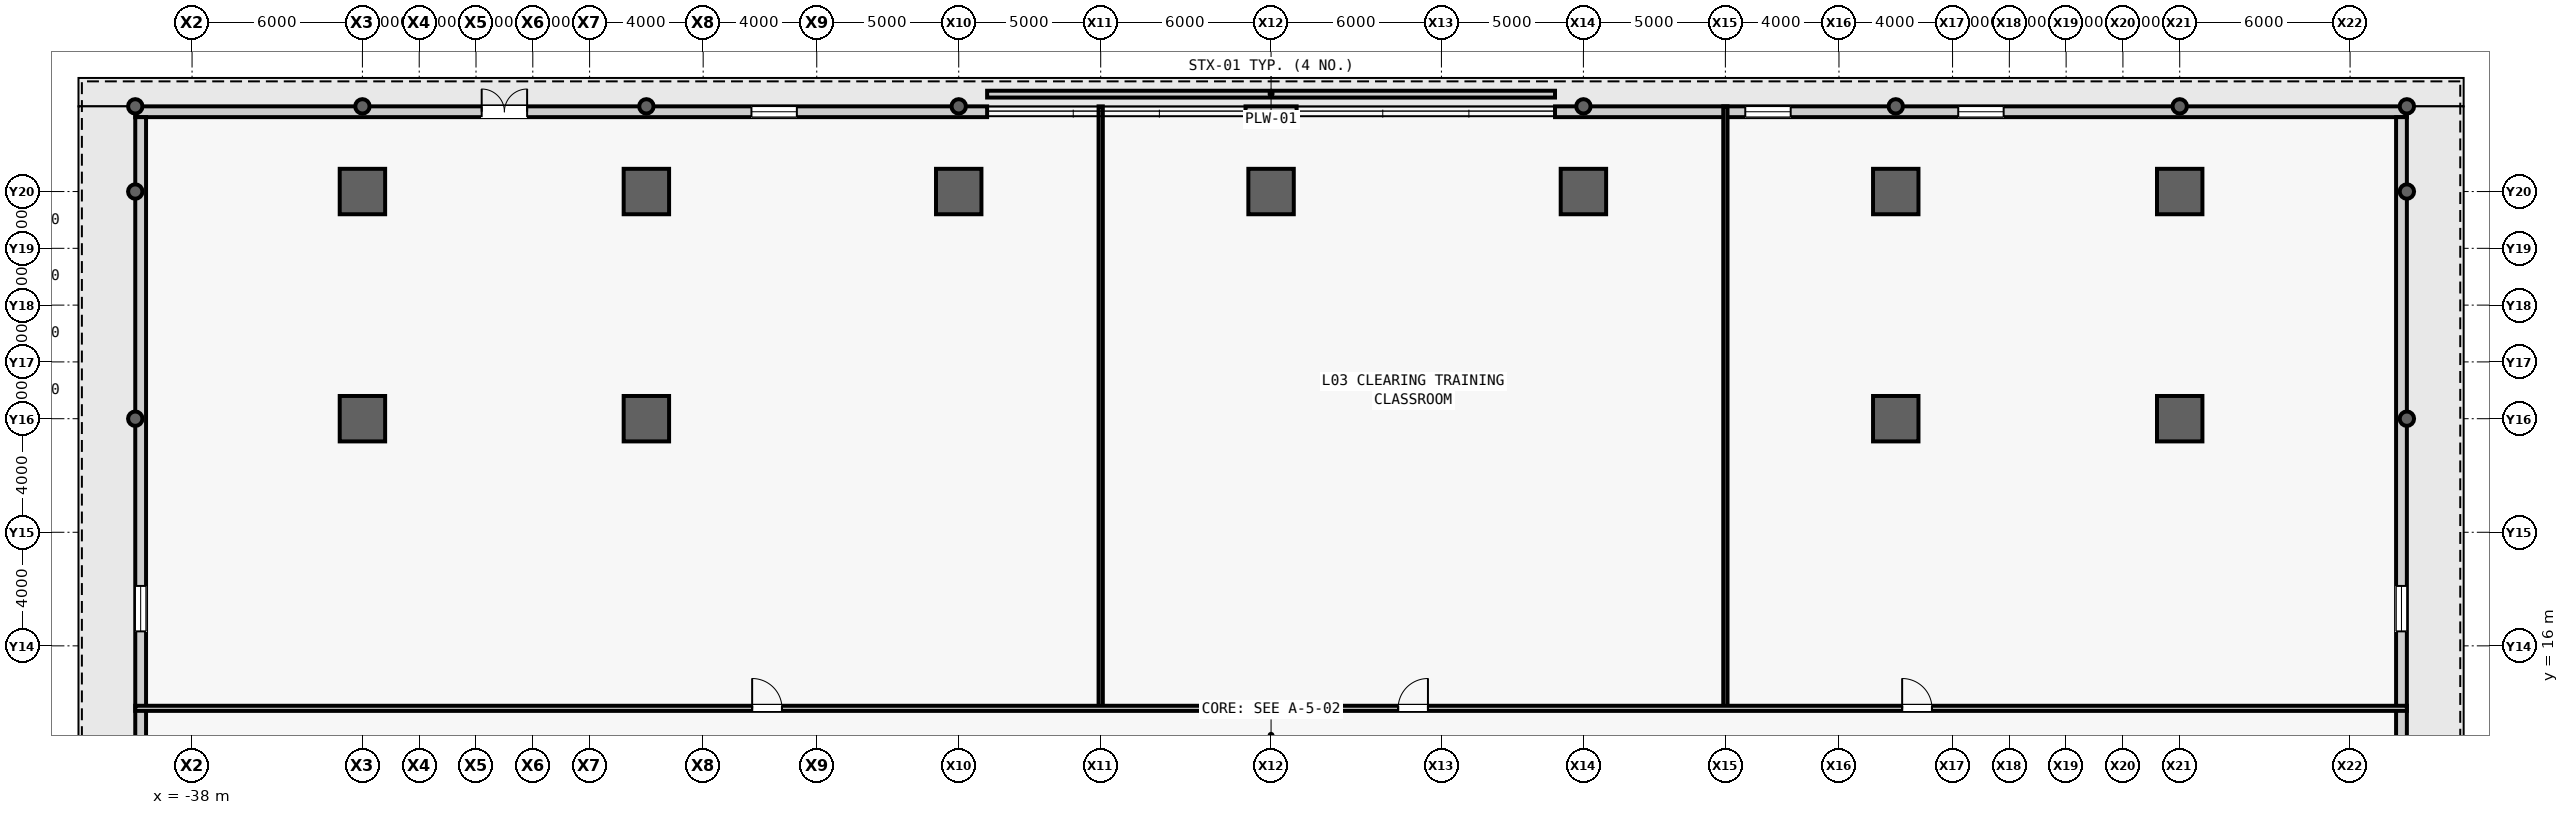
"""IFC4 building model, lengths in metres.
Left out: names, types, materials, properties, quantities, classifications, styles, units other than length and angle.
Written with IfcOpenShell. Run it as: python <this file> out.ifc"""

import sys

from ifc_helpers import new_model, si_unit, direction, frame, frame_2d, origin, origin_2d, place, context, subcontext, project, spatial, rectangle, hollow_circle, extrude, source, transform, mapped, element, fill, save


model = new_model("IFC4")
c1 = context("Model", 3, precision=1e-05, world=origin(), true_north=direction((0.0, 1.0)))
c2 = subcontext(c1, "Body", "Model", "MODEL_VIEW")
j1 = project(units=[si_unit("LENGTHUNIT", "METRE"), si_unit("PLANEANGLEUNIT", "RADIAN")], contexts=[c1])
p1 = place(None, origin())
s1 = spatial("IfcSite", under=j1, at=p1, CompositionType="ELEMENT")
p2 = place(p1, origin())
s2 = spatial("IfcBuilding", under=s1, at=p2, CompositionType="ELEMENT")
p3 = place(p2, frame((0.0, 0.0, 17.4)))
s3 = spatial("IfcBuildingStorey", under=s2, at=p3, CompositionType="ELEMENT", Elevation=17.4)
m1 = source(origin(), c2, "Body", "SweptSolid", [
    extrude(hollow_circle(Radius=0.254, WallThickness=0.025, at=origin_2d()), origin(), (0.0, 0.0, 1.0), 4.8),
])
for number, where, z_axis, x_axis in (
    (1, (-40.0, 24.0, 0.0), (0.0, 0.0, 1.0), (1.0, 0.0, 0.0)),
    (2, (-40.0, 35.0, 0.0), (0.0, 0.0, 1.0), (1.0, 0.0, 0.0)),
):
    element("IfcColumn", number, at=place(p3, frame(where, z_axis=z_axis, x_axis=x_axis)), inside=s3, PredefinedType="COLUMN", context=c2, shape_type="MappedRepresentation", body=[
        mapped(m1, transform((0.0, 0.0, 0.0), scale=1.0)),
    ])
m2 = source(origin(), c2, "Body", "SweptSolid", [
    extrude(rectangle(XDim=1.6, YDim=1.6, at=origin_2d()), origin(), (0.0, 0.0, 1.0), 4.8),
])
for number, where, z_axis, x_axis in (
    (3, (-32.0, 24.0, 0.0), (0.0, 0.0, 1.0), (1.0, 0.0, 0.0)),
    (4, (-32.0, 32.0, 0.0), (0.0, 0.0, 1.0), (1.0, 0.0, 0.0)),
):
    element("IfcColumn", number, at=place(p3, frame(where, z_axis=z_axis, x_axis=x_axis)), inside=s3, PredefinedType="COLUMN", context=c2, shape_type="MappedRepresentation", body=[
        mapped(m2, transform((0.0, 0.0, 0.0), scale=1.0)),
    ])
p4 = place(p3, frame((-32.0, 35.0, 0.0), z_axis=(0.0, 0.0, 1.0), x_axis=(1.0, 0.0, 0.0)))
e5 = element("IfcColumn", 5, at=p4, inside=s3, PredefinedType="COLUMN", context=c2, shape_type="MappedRepresentation", body=[
    mapped(m1, transform((0.0, 0.0, 0.0), scale=1.0)),
])
for number, where, z_axis, x_axis in (
    (6, (-22.0, 24.0, 0.0), (0.0, 0.0, 1.0), (1.0, 0.0, 0.0)),
    (7, (-22.0, 32.0, 0.0), (0.0, 0.0, 1.0), (1.0, 0.0, 0.0)),
):
    element("IfcColumn", number, at=place(p3, frame(where, z_axis=z_axis, x_axis=x_axis)), inside=s3, PredefinedType="COLUMN", context=c2, shape_type="MappedRepresentation", body=[
        mapped(m2, transform((0.0, 0.0, 0.0), scale=1.0)),
    ])
p5 = place(p3, frame((-22.0, 35.0, 0.0), z_axis=(0.0, 0.0, 1.0), x_axis=(1.0, 0.0, 0.0)))
e8 = element("IfcColumn", 8, at=p5, inside=s3, PredefinedType="COLUMN", context=c2, shape_type="MappedRepresentation", body=[
    mapped(m1, transform((0.0, 0.0, 0.0), scale=1.0)),
])
p6 = place(p3, frame((-11.0, 32.0, 0.0), z_axis=(0.0, 0.0, 1.0), x_axis=(1.0, 0.0, 0.0)))
e9 = element("IfcColumn", 9, at=p6, inside=s3, PredefinedType="COLUMN", context=c2, shape_type="MappedRepresentation", body=[
    mapped(m2, transform((0.0, 0.0, 0.0), scale=1.0)),
])
p7 = place(p3, frame((-11.0, 35.0, 0.0), z_axis=(0.0, 0.0, 1.0), x_axis=(1.0, 0.0, 0.0)))
e10 = element("IfcColumn", 10, at=p7, inside=s3, PredefinedType="COLUMN", context=c2, shape_type="MappedRepresentation", body=[
    mapped(m1, transform((0.0, 0.0, 0.0), scale=1.0)),
])
for number, where, z_axis, x_axis in (
    (11, (0.0, 32.0, 0.0), (0.0, 0.0, 1.0), (1.0, 0.0, 0.0)),
    (12, (11.0, 32.0, 0.0), (0.0, 0.0, 1.0), (1.0, 0.0, 0.0)),
):
    element("IfcColumn", number, at=place(p3, frame(where, z_axis=z_axis, x_axis=x_axis)), inside=s3, PredefinedType="COLUMN", context=c2, shape_type="MappedRepresentation", body=[
        mapped(m2, transform((0.0, 0.0, 0.0), scale=1.0)),
    ])
p8 = place(p3, frame((11.0, 35.0, 0.0), z_axis=(0.0, 0.0, 1.0), x_axis=(1.0, 0.0, 0.0)))
e13 = element("IfcColumn", 13, at=p8, inside=s3, PredefinedType="COLUMN", context=c2, shape_type="MappedRepresentation", body=[
    mapped(m1, transform((0.0, 0.0, 0.0), scale=1.0)),
])
for number, where, z_axis, x_axis in (
    (14, (22.0, 24.0, 0.0), (0.0, 0.0, 1.0), (1.0, 0.0, 0.0)),
    (15, (22.0, 32.0, 0.0), (0.0, 0.0, 1.0), (1.0, 0.0, 0.0)),
):
    element("IfcColumn", number, at=place(p3, frame(where, z_axis=z_axis, x_axis=x_axis)), inside=s3, PredefinedType="COLUMN", context=c2, shape_type="MappedRepresentation", body=[
        mapped(m2, transform((0.0, 0.0, 0.0), scale=1.0)),
    ])
p9 = place(p3, frame((22.0, 35.0, 0.0), z_axis=(0.0, 0.0, 1.0), x_axis=(1.0, 0.0, 0.0)))
e16 = element("IfcColumn", 16, at=p9, inside=s3, PredefinedType="COLUMN", context=c2, shape_type="MappedRepresentation", body=[
    mapped(m1, transform((0.0, 0.0, 0.0), scale=1.0)),
])
for number, where, z_axis, x_axis in (
    (17, (32.0, 24.0, 0.0), (0.0, 0.0, 1.0), (1.0, 0.0, 0.0)),
    (18, (32.0, 32.0, 0.0), (0.0, 0.0, 1.0), (1.0, 0.0, 0.0)),
):
    element("IfcColumn", number, at=place(p3, frame(where, z_axis=z_axis, x_axis=x_axis)), inside=s3, PredefinedType="COLUMN", context=c2, shape_type="MappedRepresentation", body=[
        mapped(m2, transform((0.0, 0.0, 0.0), scale=1.0)),
    ])
for number, where, z_axis, x_axis in (
    (19, (32.0, 35.0, 0.0), (0.0, 0.0, 1.0), (1.0, 0.0, 0.0)),
    (20, (40.0, 24.0, 0.0), (0.0, 0.0, 1.0), (1.0, 0.0, 0.0)),
    (21, (40.0, 35.0, 0.0), (0.0, 0.0, 1.0), (1.0, 0.0, 0.0)),
    (22, (-40.0, 32.0, 0.0), (0.0, 0.0, 1.0), (1.0, 0.0, 0.0)),
    (23, (40.0, 32.0, 0.0), (0.0, 0.0, 1.0), (1.0, 0.0, 0.0)),
):
    element("IfcColumn", number, at=place(p3, frame(where, z_axis=z_axis, x_axis=x_axis)), inside=s3, PredefinedType="COLUMN", context=c2, shape_type="MappedRepresentation", body=[
        mapped(m1, transform((0.0, 0.0, 0.0), scale=1.0)),
    ])
m3 = source(origin(), c2, "Body", "SweptSolid", [
    extrude(rectangle(XDim=30.0, YDim=0.38, at=frame_2d((15.0, 0.0))), origin(), (0.0, 0.0, 1.0), 2.68),
])
p10 = place(p3, frame((-40.0, 34.81, 0.0), z_axis=(0.0, 0.0, 1.0), x_axis=(1.0, 0.0, 0.0)))
e24 = element("IfcWall", 24, at=p10, inside=s3, PredefinedType="STANDARD", context=c2, shape_type="MappedRepresentation", body=[
    mapped(m3, transform((0.0, 0.0, 0.0), scale=1.0)),
])
m4 = source(origin(), c2, "Body", "SweptSolid", [
    extrude(rectangle(XDim=1.6, YDim=2.25, at=frame_2d((0.8, 1.125))), frame((0.0, 0.2, 0.0), z_axis=(0.0, -1.0, 0.0), x_axis=(1.0, 0.0, 0.0)), (0.0, 0.0, 1.0), 0.4),
])
p11 = place(p10, frame((12.2, 0.0, 0.0)))
e25 = element("IfcOpeningElement", 25, at=p11, cuts=e24, PredefinedType="OPENING", context=c2, shape_type="MappedRepresentation", body=[
    mapped(m4, transform((0.0, 0.0, 0.0), scale=1.0)),
])
m5 = source(origin(), c2, "Body", "SweptSolid", [
    extrude(rectangle(XDim=1.6, YDim=1.96, at=frame_2d((0.8, 0.98))), frame((0.0, 0.2, 0.0), z_axis=(0.0, -1.0, 0.0), x_axis=(1.0, 0.0, 0.0)), (0.0, 0.0, 1.0), 0.4),
])
p12 = place(p10, frame((21.7, 0.0, 0.5)))
e26 = element("IfcOpeningElement", 26, at=p12, cuts=e24, PredefinedType="OPENING", context=c2, shape_type="MappedRepresentation", body=[
    mapped(m5, transform((0.0, 0.0, 0.0), scale=1.0)),
])
m6 = source(origin(), c2, "Body", "SweptSolid", [
    extrude(rectangle(XDim=1.8, YDim=0.38, at=frame_2d((0.9, 0.0))), origin(), (0.0, 0.0, 1.0), 2.68),
])
p13 = place(p3, frame((-0.9, 34.81, 0.0), z_axis=(0.0, 0.0, 1.0), x_axis=(1.0, 0.0, 0.0)))
e27 = element("IfcWall", 27, at=p13, inside=s3, PredefinedType="STANDARD", context=c2, shape_type="MappedRepresentation", body=[
    mapped(m6, transform((0.0, 0.0, 0.0), scale=1.0)),
])
p14 = place(p3, frame((10.0, 34.81, 0.0), z_axis=(0.0, 0.0, 1.0), x_axis=(1.0, 0.0, 0.0)))
e28 = element("IfcWall", 28, at=p14, inside=s3, PredefinedType="STANDARD", context=c2, shape_type="MappedRepresentation", body=[
    mapped(m3, transform((0.0, 0.0, 0.0), scale=1.0)),
])
p15 = place(p14, frame((6.7, 0.0, 0.5)))
e29 = element("IfcOpeningElement", 29, at=p15, cuts=e28, PredefinedType="OPENING", context=c2, shape_type="MappedRepresentation", body=[
    mapped(m5, transform((0.0, 0.0, 0.0), scale=1.0)),
])
p16 = place(p14, frame((14.2, 0.0, 0.5)))
e30 = element("IfcOpeningElement", 30, at=p16, cuts=e28, PredefinedType="OPENING", context=c2, shape_type="MappedRepresentation", body=[
    mapped(m5, transform((0.0, 0.0, 0.0), scale=1.0)),
])
m7 = source(origin(), c2, "Body", "SweptSolid", [
    extrude(rectangle(XDim=69.24, YDim=0.38, at=frame_2d((34.62, 0.0))), origin(), (0.0, 0.0, 1.0), 2.68),
])
p17 = place(p3, frame((-39.81, -34.62, 0.0), z_axis=(0.0, 0.0, 1.0), x_axis=(0.0, 1.0, 0.0)))
e31 = element("IfcWall", 31, at=p17, inside=s3, PredefinedType="STANDARD", context=c2, shape_type="MappedRepresentation", body=[
    mapped(m7, transform((0.0, 0.0, 0.0), scale=1.0)),
])
p18 = place(p17, frame((39.82, 0.0, 0.0)))
e32 = element("IfcOpeningElement", 32, at=p18, cuts=e31, PredefinedType="OPENING", context=c2, shape_type="MappedRepresentation", body=[
    mapped(m4, transform((0.0, 0.0, 0.0), scale=1.0)),
])
p19 = place(p17, frame((16.51, 0.0, 0.5)))
e33 = element("IfcOpeningElement", 33, at=p19, cuts=e31, PredefinedType="OPENING", context=c2, shape_type="MappedRepresentation", body=[
    mapped(m5, transform((0.0, 0.0, 0.0), scale=1.0)),
])
p20 = place(p17, frame((51.13, 0.0, 0.5)))
e34 = element("IfcOpeningElement", 34, at=p20, cuts=e31, PredefinedType="OPENING", context=c2, shape_type="MappedRepresentation", body=[
    mapped(m5, transform((0.0, 0.0, 0.0), scale=1.0)),
])
p21 = place(p3, frame((39.81, -34.62, 0.0), z_axis=(0.0, 0.0, 1.0), x_axis=(0.0, 1.0, 0.0)))
e35 = element("IfcWall", 35, at=p21, inside=s3, PredefinedType="STANDARD", context=c2, shape_type="MappedRepresentation", body=[
    mapped(m7, transform((0.0, 0.0, 0.0), scale=1.0)),
])
p22 = place(p21, frame((39.82, 0.0, 0.0)))
e36 = element("IfcOpeningElement", 36, at=p22, cuts=e35, PredefinedType="OPENING", context=c2, shape_type="MappedRepresentation", body=[
    mapped(m4, transform((0.0, 0.0, 0.0), scale=1.0)),
])
p23 = place(p21, frame((16.51, 0.0, 0.5)))
e37 = element("IfcOpeningElement", 37, at=p23, cuts=e35, PredefinedType="OPENING", context=c2, shape_type="MappedRepresentation", body=[
    mapped(m5, transform((0.0, 0.0, 0.0), scale=1.0)),
])
p24 = place(p21, frame((51.13, 0.0, 0.5)))
e38 = element("IfcOpeningElement", 38, at=p24, cuts=e35, PredefinedType="OPENING", context=c2, shape_type="MappedRepresentation", body=[
    mapped(m5, transform((0.0, 0.0, 0.0), scale=1.0)),
])
m8 = source(origin(), c2, "Body", "SweptSolid", [
    extrude(rectangle(XDim=20.0, YDim=0.24, at=frame_2d((10.0, 0.0))), origin(), (0.0, 0.0, 1.0), 0.65),
])
p25 = place(p3, frame((-10.0, 35.43, 0.0), z_axis=(0.0, 0.0, 1.0), x_axis=(1.0, 0.0, 0.0)))
e39 = element("IfcWall", 39, at=p25, inside=s3, PredefinedType="STANDARD", context=c2, shape_type="MappedRepresentation", body=[
    mapped(m8, transform((0.0, 0.0, 0.0), scale=1.0)),
])
m9 = source(origin(), c2, "Body", "SweptSolid", [
    extrude(rectangle(XDim=21.2, YDim=0.15, at=frame_2d((10.6, 0.0))), origin(), (0.0, 0.0, 1.0), 4.48),
])
for number, where, z_axis, x_axis in (
    (40, (-6.0, 13.8, 0.0), (0.0, 0.0, 1.0), (0.0, 1.0, 0.0)),
    (41, (16.0, 13.8, 0.0), (0.0, 0.0, 1.0), (0.0, 1.0, 0.0)),
):
    element("IfcWall", number, at=place(p3, frame(where, z_axis=z_axis, x_axis=x_axis)), inside=s3, PredefinedType="PARTITIONING", context=c2, shape_type="MappedRepresentation", body=[
        mapped(m9, transform((0.0, 0.0, 0.0), scale=1.0)),
    ])
m10 = source(origin(), c2, "Body", "SweptSolid", [
    extrude(rectangle(XDim=80.0, YDim=0.18, at=frame_2d((40.0, 0.0))), origin(), (0.0, 0.0, 1.0), 4.48),
])
p26 = place(p3, frame((-40.0, 13.8, 0.0), z_axis=(0.0, 0.0, 1.0), x_axis=(1.0, 0.0, 0.0)))
e42 = element("IfcWall", 42, at=p26, inside=s3, PredefinedType="PARTITIONING", context=c2, shape_type="MappedRepresentation", body=[
    mapped(m10, transform((0.0, 0.0, 0.0), scale=1.0)),
])
m11 = source(origin(), c2, "Body", "SweptSolid", [
    extrude(rectangle(XDim=1.05, YDim=2.2, at=frame_2d((0.525, 1.1))), frame((0.0, 0.1, 0.0), z_axis=(0.0, -1.0, 0.0), x_axis=(1.0, 0.0, 0.0)), (0.0, 0.0, 1.0), 0.2),
])
p27 = place(p26, frame((21.725, 0.0, 0.0)))
e43 = element("IfcOpeningElement", 43, at=p27, cuts=e42, PredefinedType="OPENING", context=c2, shape_type="MappedRepresentation", body=[
    mapped(m11, transform((0.0, 0.0, 0.0), scale=1.0)),
])
p28 = place(p26, frame((44.475, 0.0, 0.0)))
e44 = element("IfcOpeningElement", 44, at=p28, cuts=e42, PredefinedType="OPENING", context=c2, shape_type="MappedRepresentation", body=[
    mapped(m11, transform((0.0, 0.0, 0.0), scale=1.0)),
])
p29 = place(p26, frame((62.225, 0.0, 0.0)))
e45 = element("IfcOpeningElement", 45, at=p29, cuts=e42, PredefinedType="OPENING", context=c2, shape_type="MappedRepresentation", body=[
    mapped(m11, transform((0.0, 0.0, 0.0), scale=1.0)),
])
m12 = source(origin(), c2, "Body", "SweptSolid", [
    extrude(rectangle(XDim=1.6, YDim=2.25, at=frame_2d((0.8, 1.125))), frame((0.0, 0.025, 0.0), z_axis=(0.0, -1.0, 0.0), x_axis=(1.0, 0.0, 0.0)), (0.0, 0.0, 1.0), 0.05),
])
p30 = place(p11, origin())
e46 = element("IfcDoor", 46, at=p30, inside=s3, OperationType="DOUBLE_DOOR_SINGLE_SWING", PredefinedType="DOOR", context=c2, shape_type="MappedRepresentation", body=[
    mapped(m12, transform((0.0, 0.0, 0.0), scale=1.0)),
])
fill(e25, e46)
m13 = source(origin(), c2, "Body", "SweptSolid", [
    extrude(rectangle(XDim=1.6, YDim=1.96, at=frame_2d((0.8, 0.98))), frame((0.0, 0.03, 0.0), z_axis=(0.0, -1.0, 0.0), x_axis=(1.0, 0.0, 0.0)), (0.0, 0.0, 1.0), 0.06),
])
p31 = place(p12, origin())
e47 = element("IfcWindow", 47, at=p31, inside=s3, PartitioningType="SINGLE_PANEL", PredefinedType="WINDOW", context=c2, shape_type="MappedRepresentation", body=[
    mapped(m13, transform((0.0, 0.0, 0.0), scale=1.0)),
])
fill(e26, e47)
p32 = place(p15, origin())
e48 = element("IfcWindow", 48, at=p32, inside=s3, PartitioningType="SINGLE_PANEL", PredefinedType="WINDOW", context=c2, shape_type="MappedRepresentation", body=[
    mapped(m13, transform((0.0, 0.0, 0.0), scale=1.0)),
])
fill(e29, e48)
p33 = place(p16, origin())
e49 = element("IfcWindow", 49, at=p33, inside=s3, PartitioningType="SINGLE_PANEL", PredefinedType="WINDOW", context=c2, shape_type="MappedRepresentation", body=[
    mapped(m13, transform((0.0, 0.0, 0.0), scale=1.0)),
])
fill(e30, e49)
p34 = place(p20, origin())
e50 = element("IfcWindow", 50, at=p34, inside=s3, PartitioningType="SINGLE_PANEL", PredefinedType="WINDOW", context=c2, shape_type="MappedRepresentation", body=[
    mapped(m13, transform((0.0, 0.0, 0.0), scale=1.0)),
])
fill(e34, e50)
p35 = place(p24, origin())
e51 = element("IfcWindow", 51, at=p35, inside=s3, PartitioningType="SINGLE_PANEL", PredefinedType="WINDOW", context=c2, shape_type="MappedRepresentation", body=[
    mapped(m13, transform((0.0, 0.0, 0.0), scale=1.0)),
])
fill(e38, e51)
m14 = source(origin(), c2, "Body", "SweptSolid", [
    extrude(rectangle(XDim=1.05, YDim=2.2, at=frame_2d((0.525, 1.1))), frame((0.0, 0.025, 0.0), z_axis=(0.0, -1.0, 0.0), x_axis=(1.0, 0.0, 0.0)), (0.0, 0.0, 1.0), 0.05),
])
p36 = place(p27, origin())
e52 = element("IfcDoor", 52, at=p36, inside=s3, OperationType="SINGLE_SWING_LEFT", PredefinedType="DOOR", context=c2, shape_type="MappedRepresentation", body=[
    mapped(m14, transform((0.0, 0.0, 0.0), scale=1.0)),
])
fill(e43, e52)
p37 = place(p28, origin())
e53 = element("IfcDoor", 53, at=p37, inside=s3, OperationType="SINGLE_SWING_RIGHT", PredefinedType="DOOR", context=c2, shape_type="MappedRepresentation", body=[
    mapped(m14, transform((0.0, 0.0, 0.0), scale=1.0)),
])
fill(e44, e53)
p38 = place(p29, origin())
e54 = element("IfcDoor", 54, at=p38, inside=s3, OperationType="SINGLE_SWING_LEFT", PredefinedType="DOOR", context=c2, shape_type="MappedRepresentation", body=[
    mapped(m14, transform((0.0, 0.0, 0.0), scale=1.0)),
])
fill(e45, e54)
save(model, sys.argv[1])
